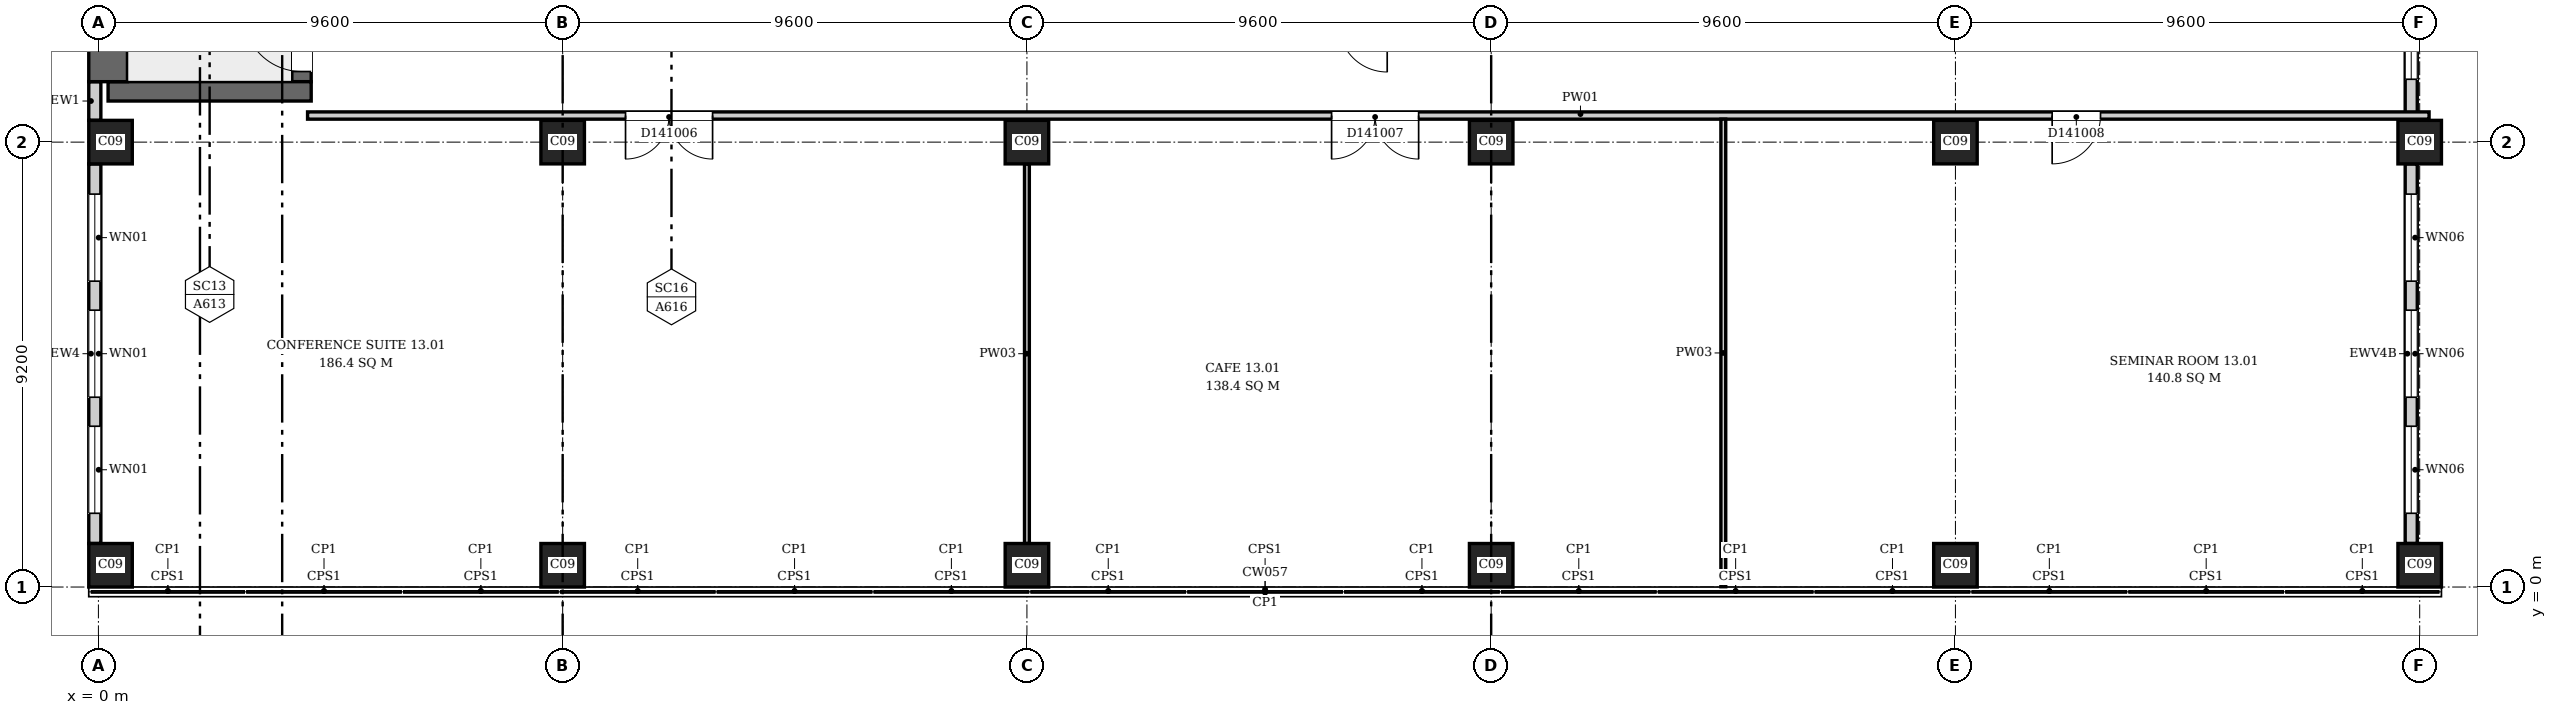
"""IFC4 building model, lengths in metres.
Left out: names, types, materials, properties, quantities, classifications, styles, units other than length and angle.
Written with IfcOpenShell. Run it as: python <this file> out.ifc"""

import sys

from ifc_helpers import new_model, si_unit, direction, frame, frame_2d, origin, origin_2d, place, context, subcontext, project, spatial, rectangle, extrude, element, fill, save


model = new_model("IFC4")
c1 = context("Model", 3, precision=1e-05, world=origin(), true_north=direction((0.0, 1.0)))
c2 = subcontext(c1, "Body", "Model", "MODEL_VIEW")
j1 = project(units=[si_unit("LENGTHUNIT", "METRE"), si_unit("PLANEANGLEUNIT", "RADIAN")], contexts=[c1])
p1 = place(None, origin())
s1 = spatial("IfcSite", under=j1, at=p1, CompositionType="ELEMENT")
p2 = place(p1, origin())
s2 = spatial("IfcBuilding", under=s1, at=p2, CompositionType="ELEMENT")
p3 = place(p2, frame((0.0, 0.0, 65.5)))
s3 = spatial("IfcBuildingStorey", under=s2, at=p3, CompositionType="ELEMENT", Elevation=65.5)
p4 = place(p3, frame((0.2, 10.25, 0.0), z_axis=(0.0, 0.0, 1.0), x_axis=(1.0, 0.0, 0.0)))
e1 = element("IfcWall", 1, at=p4, inside=s3, PredefinedType="SHEAR", context=c2, shape_type="SweptSolid", body=[
    extrude(rectangle(XDim=4.2, YDim=0.4, at=frame_2d((2.1, 0.0))), origin(), (0.0, 0.0, 1.0), 4.2),
])
p5 = place(p3, frame((0.2, 10.45, 0.0), z_axis=(0.0, 0.0, 1.0), x_axis=(0.0, 1.0, 0.0)))
e2 = element("IfcWall", 2, at=p5, inside=s3, PredefinedType="SHEAR", context=c2, shape_type="SweptSolid", body=[
    extrude(rectangle(XDim=6.6, YDim=0.8, at=frame_2d((3.3, 0.0))), origin(), (0.0, 0.0, 1.0), 4.2),
])
p6 = place(p3, frame((4.2, 10.45, 0.0), z_axis=(0.0, 0.0, 1.0), x_axis=(0.0, 1.0, 0.0)))
e3 = element("IfcWall", 3, at=p6, inside=s3, PredefinedType="SHEAR", context=c2, shape_type="SweptSolid", body=[
    extrude(rectangle(XDim=6.6, YDim=0.4, at=frame_2d((3.3, 0.0))), origin(), (0.0, 0.0, 1.0), 4.2),
])
p7 = place(p6, frame((0.21, 0.0, 0.0)))
e4 = element("IfcOpeningElement", 4, at=p7, cuts=e3, PredefinedType="OPENING", context=c2, shape_type="SweptSolid", body=[
    extrude(rectangle(XDim=1.2, YDim=2.1, at=frame_2d((0.6, 1.05))), frame((0.0, 0.21, 0.0), z_axis=(0.0, -1.0, 0.0), x_axis=(1.0, 0.0, 0.0)), (0.0, 0.0, 1.0), 0.42),
])
for number, where, z_axis, x_axis in (
    (5, (0.25, 0.45, 0.0), (0.0, 0.0, 1.0), (1.0, 0.0, 0.0)),
    (6, (9.6, 0.45, 0.0), (0.0, 0.0, 1.0), (1.0, 0.0, 0.0)),
    (7, (19.2, 0.45, 0.0), (0.0, 0.0, 1.0), (1.0, 0.0, 0.0)),
    (8, (28.8, 0.45, 0.0), (0.0, 0.0, 1.0), (1.0, 0.0, 0.0)),
    (9, (38.4, 0.45, 0.0), (0.0, 0.0, 1.0), (1.0, 0.0, 0.0)),
    (10, (48.0, 0.45, 0.0), (0.0, 0.0, 1.0), (1.0, 0.0, 0.0)),
    (11, (0.25, 9.2, 0.0), (0.0, 0.0, 1.0), (1.0, 0.0, 0.0)),
    (12, (9.6, 9.2, 0.0), (0.0, 0.0, 1.0), (1.0, 0.0, 0.0)),
    (13, (19.2, 9.2, 0.0), (0.0, 0.0, 1.0), (1.0, 0.0, 0.0)),
    (14, (28.8, 9.2, 0.0), (0.0, 0.0, 1.0), (1.0, 0.0, 0.0)),
    (15, (38.4, 9.2, 0.0), (0.0, 0.0, 1.0), (1.0, 0.0, 0.0)),
    (16, (48.0, 9.2, 0.0), (0.0, 0.0, 1.0), (1.0, 0.0, 0.0)),
):
    element("IfcColumn", number, at=place(p3, frame(where, z_axis=z_axis, x_axis=x_axis)), inside=s3, PredefinedType="COLUMN", context=c2, shape_type="SweptSolid", body=[
        extrude(rectangle(XDim=0.9, YDim=0.9, at=origin_2d()), origin(), (0.0, 0.0, 1.0), 4.2),
    ])
p8 = place(p3, frame((-0.074, 8.75, 0.0), z_axis=(0.0, 0.0, 1.0), x_axis=(0.0, -1.0, 0.0)))
e17 = element("IfcWall", 17, at=p8, inside=s3, PredefinedType="ELEMENTEDWALL", context=c2, shape_type="SweptSolid", body=[
    extrude(rectangle(XDim=7.85, YDim=0.25, at=frame_2d((3.925, 0.0))), origin(), (0.0, 0.0, 1.0), 3.9),
])
p9 = place(p8, frame((5.425, 0.0, 0.9)))
e18 = element("IfcOpeningElement", 18, at=p9, cuts=e17, PredefinedType="OPENING", context=c2, shape_type="SweptSolid", body=[
    extrude(rectangle(XDim=1.8, YDim=2.6, at=frame_2d((0.9, 1.3))), frame((0.0, 0.135, 0.0), z_axis=(0.0, -1.0, 0.0), x_axis=(1.0, 0.0, 0.0)), (0.0, 0.0, 1.0), 0.27),
])
p10 = place(p8, frame((3.025, 0.0, 0.9)))
e19 = element("IfcOpeningElement", 19, at=p10, cuts=e17, PredefinedType="OPENING", context=c2, shape_type="SweptSolid", body=[
    extrude(rectangle(XDim=1.8, YDim=2.6, at=frame_2d((0.9, 1.3))), frame((0.0, 0.135, 0.0), z_axis=(0.0, -1.0, 0.0), x_axis=(1.0, 0.0, 0.0)), (0.0, 0.0, 1.0), 0.27),
])
p11 = place(p8, frame((0.625, 0.0, 0.9)))
e20 = element("IfcOpeningElement", 20, at=p11, cuts=e17, PredefinedType="OPENING", context=c2, shape_type="SweptSolid", body=[
    extrude(rectangle(XDim=1.8, YDim=2.6, at=frame_2d((0.9, 1.3))), frame((0.0, 0.135, 0.0), z_axis=(0.0, -1.0, 0.0), x_axis=(1.0, 0.0, 0.0)), (0.0, 0.0, 1.0), 0.27),
])
p12 = place(p3, frame((-0.074, 10.45, 0.0), z_axis=(0.0, 0.0, 1.0), x_axis=(0.0, -1.0, 0.0)))
e21 = element("IfcWall", 21, at=p12, inside=s3, PredefinedType="ELEMENTEDWALL", context=c2, shape_type="SweptSolid", body=[
    extrude(rectangle(XDim=0.8, YDim=0.25, at=frame_2d((0.4, 0.0))), origin(), (0.0, 0.0, 1.0), 3.9),
])
p13 = place(p3, frame((47.825, 0.9, 0.0), z_axis=(0.0, 0.0, 1.0), x_axis=(0.0, 1.0, 0.0)))
e22 = element("IfcWall", 22, at=p13, inside=s3, PredefinedType="ELEMENTEDWALL", context=c2, shape_type="SweptSolid", body=[
    extrude(rectangle(XDim=7.85, YDim=0.25, at=frame_2d((3.925, 0.0))), origin(), (0.0, 0.0, 1.0), 3.3),
])
p14 = place(p13, frame((0.625, 0.0, 0.6)))
e23 = element("IfcOpeningElement", 23, at=p14, cuts=e22, PredefinedType="OPENING", context=c2, shape_type="SweptSolid", body=[
    extrude(rectangle(XDim=1.8, YDim=2.6, at=frame_2d((0.9, 1.3))), frame((0.0, 0.135, 0.0), z_axis=(0.0, -1.0, 0.0), x_axis=(1.0, 0.0, 0.0)), (0.0, 0.0, 1.0), 0.27),
])
p15 = place(p13, frame((3.025, 0.0, 0.6)))
e24 = element("IfcOpeningElement", 24, at=p15, cuts=e22, PredefinedType="OPENING", context=c2, shape_type="SweptSolid", body=[
    extrude(rectangle(XDim=1.8, YDim=2.6, at=frame_2d((0.9, 1.3))), frame((0.0, 0.135, 0.0), z_axis=(0.0, -1.0, 0.0), x_axis=(1.0, 0.0, 0.0)), (0.0, 0.0, 1.0), 0.27),
])
p16 = place(p13, frame((5.425, 0.0, 0.6)))
e25 = element("IfcOpeningElement", 25, at=p16, cuts=e22, PredefinedType="OPENING", context=c2, shape_type="SweptSolid", body=[
    extrude(rectangle(XDim=1.8, YDim=2.6, at=frame_2d((0.9, 1.3))), frame((0.0, 0.135, 0.0), z_axis=(0.0, -1.0, 0.0), x_axis=(1.0, 0.0, 0.0)), (0.0, 0.0, 1.0), 0.27),
])
p17 = place(p3, frame((47.825, 9.65, 0.0), z_axis=(0.0, 0.0, 1.0), x_axis=(0.0, 1.0, 0.0)))
e26 = element("IfcWall", 26, at=p17, inside=s3, PredefinedType="ELEMENTEDWALL", context=c2, shape_type="SweptSolid", body=[
    extrude(rectangle(XDim=8.3, YDim=0.25, at=frame_2d((4.15, 0.0))), origin(), (0.0, 0.0, 1.0), 3.3),
])
p18 = place(p17, frame((0.85, 0.0, 0.6)))
e27 = element("IfcOpeningElement", 27, at=p18, cuts=e26, PredefinedType="OPENING", context=c2, shape_type="SweptSolid", body=[
    extrude(rectangle(XDim=1.8, YDim=2.6, at=frame_2d((0.9, 1.3))), frame((0.0, 0.135, 0.0), z_axis=(0.0, -1.0, 0.0), x_axis=(1.0, 0.0, 0.0)), (0.0, 0.0, 1.0), 0.27),
])
p19 = place(p17, frame((3.25, 0.0, 0.6)))
e28 = element("IfcOpeningElement", 28, at=p19, cuts=e26, PredefinedType="OPENING", context=c2, shape_type="SweptSolid", body=[
    extrude(rectangle(XDim=1.8, YDim=2.6, at=frame_2d((0.9, 1.3))), frame((0.0, 0.135, 0.0), z_axis=(0.0, -1.0, 0.0), x_axis=(1.0, 0.0, 0.0)), (0.0, 0.0, 1.0), 0.27),
])
p20 = place(p17, frame((5.65, 0.0, 0.6)))
e29 = element("IfcOpeningElement", 29, at=p20, cuts=e26, PredefinedType="OPENING", context=c2, shape_type="SweptSolid", body=[
    extrude(rectangle(XDim=1.8, YDim=2.6, at=frame_2d((0.9, 1.3))), frame((0.0, 0.135, 0.0), z_axis=(0.0, -1.0, 0.0), x_axis=(1.0, 0.0, 0.0)), (0.0, 0.0, 1.0), 0.27),
])
p21 = place(p3, frame((4.325, 9.75, 0.0), z_axis=(0.0, 0.0, 1.0), x_axis=(1.0, 0.0, 0.0)))
e30 = element("IfcWall", 30, at=p21, inside=s3, PredefinedType="PARTITIONING", context=c2, shape_type="SweptSolid", body=[
    extrude(rectangle(XDim=43.869, YDim=0.15, at=frame_2d((21.935, 0.0))), origin(), (0.0, 0.0, 1.0), 3.9),
])
p22 = place(p21, frame((6.575, 0.0, 0.0)))
e31 = element("IfcOpeningElement", 31, at=p22, cuts=e30, PredefinedType="OPENING", context=c2, shape_type="SweptSolid", body=[
    extrude(rectangle(XDim=1.8, YDim=2.1, at=frame_2d((0.9, 1.05))), frame((0.0, 0.085, 0.0), z_axis=(0.0, -1.0, 0.0), x_axis=(1.0, 0.0, 0.0)), (0.0, 0.0, 1.0), 0.17),
])
p23 = place(p21, frame((21.175, 0.0, 0.0)))
e32 = element("IfcOpeningElement", 32, at=p23, cuts=e30, PredefinedType="OPENING", context=c2, shape_type="SweptSolid", body=[
    extrude(rectangle(XDim=1.8, YDim=2.1, at=frame_2d((0.9, 1.05))), frame((0.0, 0.085, 0.0), z_axis=(0.0, -1.0, 0.0), x_axis=(1.0, 0.0, 0.0)), (0.0, 0.0, 1.0), 0.17),
])
p24 = place(p21, frame((36.075, 0.0, 0.0)))
e33 = element("IfcOpeningElement", 33, at=p24, cuts=e30, PredefinedType="OPENING", context=c2, shape_type="SweptSolid", body=[
    extrude(rectangle(XDim=1.0, YDim=2.1, at=frame_2d((0.5, 1.05))), frame((0.0, 0.085, 0.0), z_axis=(0.0, -1.0, 0.0), x_axis=(1.0, 0.0, 0.0)), (0.0, 0.0, 1.0), 0.17),
])
p25 = place(p3, frame((19.2, 0.9, 0.0), z_axis=(0.0, 0.0, 1.0), x_axis=(0.0, 1.0, 0.0)))
e34 = element("IfcWall", 34, at=p25, inside=s3, PredefinedType="PARTITIONING", context=c2, shape_type="SweptSolid", body=[
    extrude(rectangle(XDim=7.85, YDim=0.1, at=frame_2d((3.925, 0.0))), origin(), (0.0, 0.0, 1.0), 3.9),
])
p26 = place(p3, frame((33.6, 0.006, 0.0), z_axis=(0.0, 0.0, 1.0), x_axis=(0.0, 1.0, 0.0)))
e35 = element("IfcWall", 35, at=p26, inside=s3, PredefinedType="PARTITIONING", context=c2, shape_type="SweptSolid", body=[
    extrude(rectangle(XDim=9.669, YDim=0.1, at=frame_2d((4.834, 0.0))), origin(), (0.0, 0.0, 1.0), 3.9),
])
p27 = place(p9, origin())
e36 = element("IfcWindow", 36, at=p27, inside=s3, PartitioningType="SINGLE_PANEL", PredefinedType="WINDOW", context=c2, shape_type="SweptSolid", body=[
    extrude(rectangle(XDim=1.8, YDim=2.6, at=frame_2d((0.9, 1.3))), frame((0.0, 0.03, 0.0), z_axis=(0.0, -1.0, 0.0), x_axis=(1.0, 0.0, 0.0)), (0.0, 0.0, 1.0), 0.06),
])
fill(e18, e36)
p28 = place(p10, origin())
e37 = element("IfcWindow", 37, at=p28, inside=s3, PartitioningType="SINGLE_PANEL", PredefinedType="WINDOW", context=c2, shape_type="SweptSolid", body=[
    extrude(rectangle(XDim=1.8, YDim=2.6, at=frame_2d((0.9, 1.3))), frame((0.0, 0.03, 0.0), z_axis=(0.0, -1.0, 0.0), x_axis=(1.0, 0.0, 0.0)), (0.0, 0.0, 1.0), 0.06),
])
fill(e19, e37)
p29 = place(p11, origin())
e38 = element("IfcWindow", 38, at=p29, inside=s3, PartitioningType="SINGLE_PANEL", PredefinedType="WINDOW", context=c2, shape_type="SweptSolid", body=[
    extrude(rectangle(XDim=1.8, YDim=2.6, at=frame_2d((0.9, 1.3))), frame((0.0, 0.03, 0.0), z_axis=(0.0, -1.0, 0.0), x_axis=(1.0, 0.0, 0.0)), (0.0, 0.0, 1.0), 0.06),
])
fill(e20, e38)
p30 = place(p14, origin())
e39 = element("IfcWindow", 39, at=p30, inside=s3, PartitioningType="SINGLE_PANEL", PredefinedType="WINDOW", context=c2, shape_type="SweptSolid", body=[
    extrude(rectangle(XDim=1.8, YDim=2.6, at=frame_2d((0.9, 1.3))), frame((0.0, 0.03, 0.0), z_axis=(0.0, -1.0, 0.0), x_axis=(1.0, 0.0, 0.0)), (0.0, 0.0, 1.0), 0.06),
])
fill(e23, e39)
p31 = place(p15, origin())
e40 = element("IfcWindow", 40, at=p31, inside=s3, PartitioningType="SINGLE_PANEL", PredefinedType="WINDOW", context=c2, shape_type="SweptSolid", body=[
    extrude(rectangle(XDim=1.8, YDim=2.6, at=frame_2d((0.9, 1.3))), frame((0.0, 0.03, 0.0), z_axis=(0.0, -1.0, 0.0), x_axis=(1.0, 0.0, 0.0)), (0.0, 0.0, 1.0), 0.06),
])
fill(e24, e40)
p32 = place(p16, origin())
e41 = element("IfcWindow", 41, at=p32, inside=s3, PartitioningType="SINGLE_PANEL", PredefinedType="WINDOW", context=c2, shape_type="SweptSolid", body=[
    extrude(rectangle(XDim=1.8, YDim=2.6, at=frame_2d((0.9, 1.3))), frame((0.0, 0.03, 0.0), z_axis=(0.0, -1.0, 0.0), x_axis=(1.0, 0.0, 0.0)), (0.0, 0.0, 1.0), 0.06),
])
fill(e25, e41)
p33 = place(p18, origin())
e42 = element("IfcWindow", 42, at=p33, inside=s3, PartitioningType="SINGLE_PANEL", PredefinedType="WINDOW", context=c2, shape_type="SweptSolid", body=[
    extrude(rectangle(XDim=1.8, YDim=2.6, at=frame_2d((0.9, 1.3))), frame((0.0, 0.03, 0.0), z_axis=(0.0, -1.0, 0.0), x_axis=(1.0, 0.0, 0.0)), (0.0, 0.0, 1.0), 0.06),
])
fill(e27, e42)
p34 = place(p7, origin())
e43 = element("IfcDoor", 43, at=p34, inside=s3, OperationType="SINGLE_SWING_RIGHT", PredefinedType="DOOR", context=c2, shape_type="SweptSolid", body=[
    extrude(rectangle(XDim=1.2, YDim=2.1, at=frame_2d((0.6, 1.05))), frame((0.0, 0.025, 0.0), z_axis=(0.0, -1.0, 0.0), x_axis=(1.0, 0.0, 0.0)), (0.0, 0.0, 1.0), 0.05),
])
fill(e4, e43)
p35 = place(p22, origin())
e44 = element("IfcDoor", 44, at=p35, inside=s3, OperationType="DOUBLE_DOOR_SINGLE_SWING", PredefinedType="DOOR", context=c2, shape_type="SweptSolid", body=[
    extrude(rectangle(XDim=1.8, YDim=2.1, at=frame_2d((0.9, 1.05))), frame((0.0, 0.025, 0.0), z_axis=(0.0, -1.0, 0.0), x_axis=(1.0, 0.0, 0.0)), (0.0, 0.0, 1.0), 0.05),
])
fill(e31, e44)
p36 = place(p23, origin())
e45 = element("IfcDoor", 45, at=p36, inside=s3, OperationType="DOUBLE_DOOR_SINGLE_SWING", PredefinedType="DOOR", context=c2, shape_type="SweptSolid", body=[
    extrude(rectangle(XDim=1.8, YDim=2.1, at=frame_2d((0.9, 1.05))), frame((0.0, 0.025, 0.0), z_axis=(0.0, -1.0, 0.0), x_axis=(1.0, 0.0, 0.0)), (0.0, 0.0, 1.0), 0.05),
])
fill(e32, e45)
p37 = place(p24, origin())
e46 = element("IfcDoor", 46, at=p37, inside=s3, OperationType="SINGLE_SWING_LEFT", PredefinedType="DOOR", context=c2, shape_type="SweptSolid", body=[
    extrude(rectangle(XDim=1.0, YDim=2.1, at=frame_2d((0.5, 1.05))), frame((0.0, 0.025, 0.0), z_axis=(0.0, -1.0, 0.0), x_axis=(1.0, 0.0, 0.0)), (0.0, 0.0, 1.0), 0.05),
])
fill(e33, e46)
save(model, sys.argv[1])
